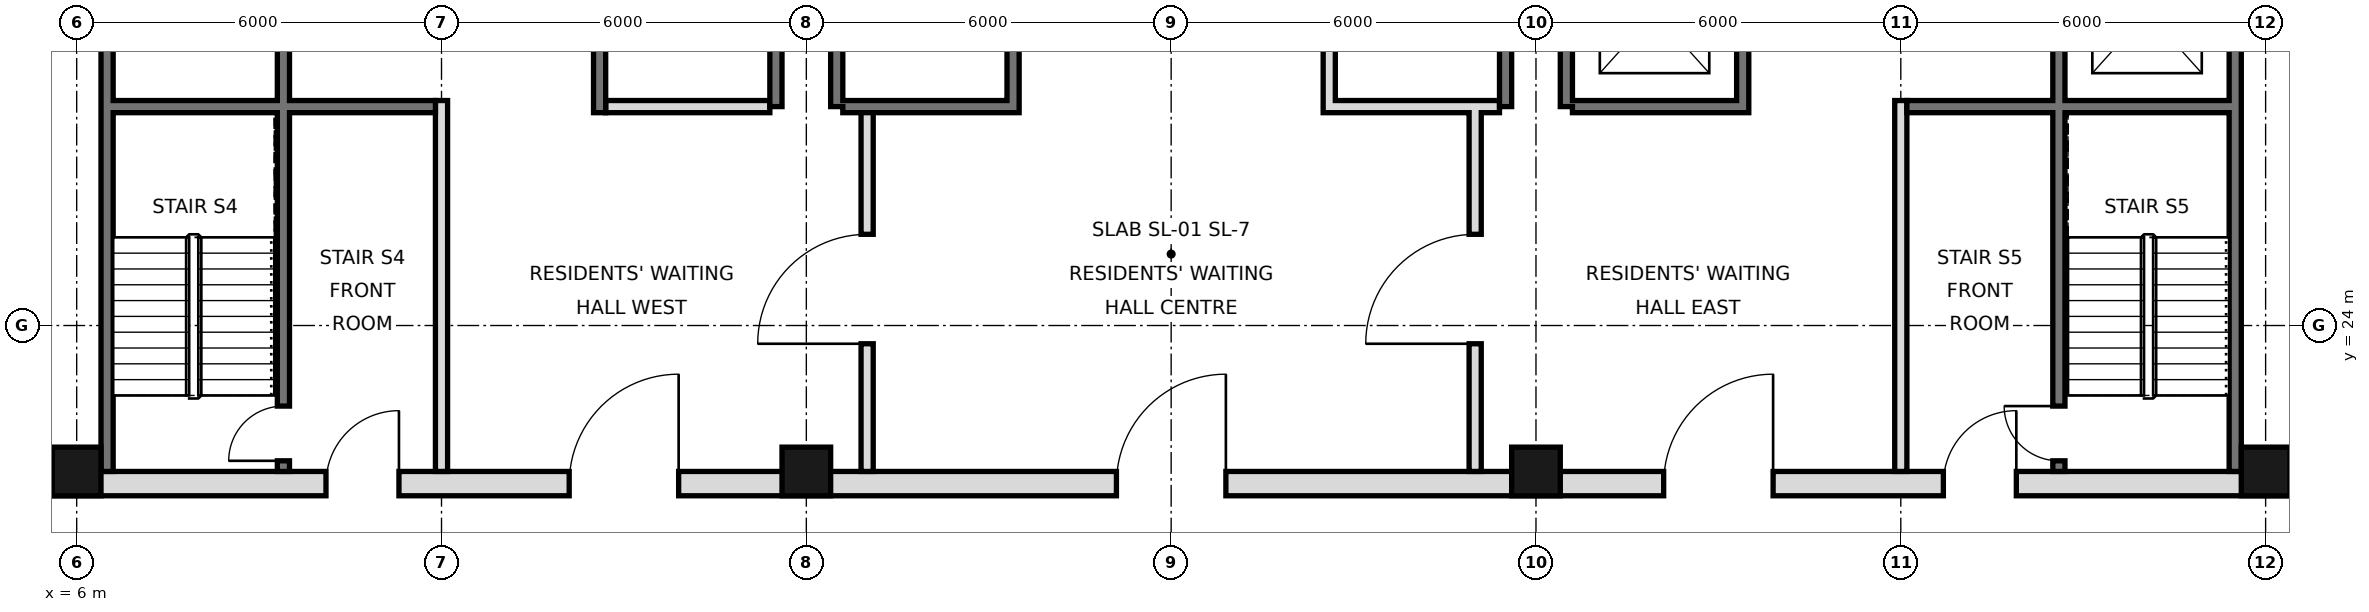
"""IFC4 building model, lengths in metres.
Left out: names, types, materials, properties, quantities, classifications, styles, units other than length and angle.
Written with IfcOpenShell. Run it as: python <this file> out.ifc"""

import sys

from ifc_helpers import new_model, si_unit, direction, frame, frame_2d, origin, origin_2d, place, context, subcontext, project, spatial, rectangle, hollow_rectangle, extrude, element, fill, save


model = new_model("IFC4")
c1 = context("Model", 3, precision=1e-05, world=origin(), true_north=direction((0.0, 1.0)))
c2 = subcontext(c1, "Body", "Model", "MODEL_VIEW")
j1 = project(units=[si_unit("LENGTHUNIT", "METRE"), si_unit("PLANEANGLEUNIT", "RADIAN")], contexts=[c1])
p1 = place(None, origin())
s1 = spatial("IfcSite", under=j1, at=p1, CompositionType="ELEMENT")
p2 = place(p1, origin())
s2 = spatial("IfcBuilding", under=s1, at=p2, CompositionType="ELEMENT")
p3 = place(p2, frame((0.0, 0.0, 195.6)))
s3 = spatial("IfcBuildingStorey", under=s2, at=p3, CompositionType="ELEMENT", Elevation=195.6)
for number, where, z_axis, x_axis in (
    (1, (6.0, 21.6, 0.0), (0.0, 0.0, 1.0), (1.0, 0.0, 0.0)),
    (2, (18.0, 21.6, 0.0), (0.0, 0.0, 1.0), (1.0, 0.0, 0.0)),
    (3, (30.0, 21.6, 0.0), (0.0, 0.0, 1.0), (1.0, 0.0, 0.0)),
    (4, (42.0, 21.6, 0.0), (0.0, 0.0, 1.0), (1.0, 0.0, 0.0)),
):
    element("IfcColumn", number, at=place(p3, frame(where, z_axis=z_axis, x_axis=x_axis)), inside=s3, PredefinedType="COLUMN", context=c2, shape_type="SweptSolid", body=[
        extrude(hollow_rectangle(XDim=0.8, YDim=0.8, WallThickness=0.045, at=origin_2d()), origin(), (0.0, 0.0, 1.0), 3.6),
    ])
for number, where, z_axis, x_axis in (
    (5, (6.5, 21.6, 0.0), (0.0, 0.0, 1.0), (0.0, 1.0, 0.0)),
    (6, (41.5, 21.6, 0.0), (0.0, 0.0, 1.0), (0.0, 1.0, 0.0)),
):
    element("IfcWall", number, at=place(p3, frame(where, z_axis=z_axis, x_axis=x_axis)), inside=s3, PredefinedType="SOLIDWALL", context=c2, shape_type="SweptSolid", body=[
        extrude(rectangle(XDim=23.5, YDim=0.2, at=frame_2d((11.75, 0.0))), origin(), (0.0, 0.0, 1.0), 3.42),
    ])
for number, where, z_axis, x_axis in (
    (7, (17.5, 27.6, 0.0), (0.0, 0.0, 1.0), (0.0, 1.0, 0.0)),
    (8, (18.5, 27.6, 0.0), (0.0, 0.0, 1.0), (0.0, 1.0, 0.0)),
    (9, (29.5, 27.6, 0.0), (0.0, 0.0, 1.0), (0.0, 1.0, 0.0)),
    (10, (30.5, 27.6, 0.0), (0.0, 0.0, 1.0), (0.0, 1.0, 0.0)),
):
    element("IfcWall", number, at=place(p3, frame(where, z_axis=z_axis, x_axis=x_axis)), inside=s3, PredefinedType="SOLIDWALL", context=c2, shape_type="SweptSolid", body=[
        extrude(rectangle(XDim=17.5, YDim=0.2, at=frame_2d((8.75, 0.0))), origin(), (0.0, 0.0, 1.0), 3.42),
    ])
p4 = place(p3, frame((5.6, 21.4, 0.0), z_axis=(0.0, 0.0, 1.0), x_axis=(1.0, 0.0, 0.0)))
e11 = element("IfcWall", 11, at=p4, inside=s3, PredefinedType="SOLIDWALL", context=c2, shape_type="SweptSolid", body=[
    extrude(rectangle(XDim=36.8, YDim=0.4, at=frame_2d((18.4, 0.0))), origin(), (0.0, 0.0, 1.0), 3.42),
])
p5 = place(p4, frame((8.5, 0.0, 0.0)))
e12 = element("IfcOpeningElement", 12, at=p5, cuts=e11, PredefinedType="OPENING", context=c2, shape_type="SweptSolid", body=[
    extrude(rectangle(XDim=1.8, YDim=2.1, at=frame_2d((0.9, 1.05))), frame((0.0, 0.21, 0.0), z_axis=(0.0, -1.0, 0.0), x_axis=(1.0, 0.0, 0.0)), (0.0, 0.0, 1.0), 0.42),
])
p6 = place(p4, frame((17.5, 0.0, 0.0)))
e13 = element("IfcOpeningElement", 13, at=p6, cuts=e11, PredefinedType="OPENING", context=c2, shape_type="SweptSolid", body=[
    extrude(rectangle(XDim=1.8, YDim=2.1, at=frame_2d((0.9, 1.05))), frame((0.0, 0.21, 0.0), z_axis=(0.0, -1.0, 0.0), x_axis=(1.0, 0.0, 0.0)), (0.0, 0.0, 1.0), 0.42),
])
p7 = place(p4, frame((26.5, 0.0, 0.0)))
e14 = element("IfcOpeningElement", 14, at=p7, cuts=e11, PredefinedType="OPENING", context=c2, shape_type="SweptSolid", body=[
    extrude(rectangle(XDim=1.8, YDim=2.1, at=frame_2d((0.9, 1.05))), frame((0.0, 0.21, 0.0), z_axis=(0.0, -1.0, 0.0), x_axis=(1.0, 0.0, 0.0)), (0.0, 0.0, 1.0), 0.42),
])
p8 = place(p4, frame((4.5, 0.0, 0.0)))
e15 = element("IfcOpeningElement", 15, at=p8, cuts=e11, PredefinedType="OPENING", context=c2, shape_type="SweptSolid", body=[
    extrude(rectangle(XDim=1.2, YDim=2.1, at=frame_2d((0.6, 1.05))), frame((0.0, 0.21, 0.0), z_axis=(0.0, -1.0, 0.0), x_axis=(1.0, 0.0, 0.0)), (0.0, 0.0, 1.0), 0.42),
])
p9 = place(p4, frame((31.1, 0.0, 0.0)))
e16 = element("IfcOpeningElement", 16, at=p9, cuts=e11, PredefinedType="OPENING", context=c2, shape_type="SweptSolid", body=[
    extrude(rectangle(XDim=1.2, YDim=2.1, at=frame_2d((0.6, 1.05))), frame((0.0, 0.21, 0.0), z_axis=(0.0, -1.0, 0.0), x_axis=(1.0, 0.0, 0.0)), (0.0, 0.0, 1.0), 0.42),
])
p10 = place(p3, frame((19.0, 21.6, 0.0), z_axis=(0.0, 0.0, 1.0), x_axis=(0.0, 1.0, 0.0)))
e17 = element("IfcWall", 17, at=p10, inside=s3, PredefinedType="PARTITIONING", context=c2, shape_type="SweptSolid", body=[
    extrude(rectangle(XDim=6.0, YDim=0.2, at=frame_2d((3.0, 0.0))), origin(), (0.0, 0.0, 1.0), 3.42),
])
p11 = place(p10, frame((2.1, 0.0, 0.0)))
e18 = element("IfcOpeningElement", 18, at=p11, cuts=e17, PredefinedType="OPENING", context=c2, shape_type="SweptSolid", body=[
    extrude(rectangle(XDim=1.8, YDim=2.1, at=frame_2d((0.9, 1.05))), frame((0.0, 0.11, 0.0), z_axis=(0.0, -1.0, 0.0), x_axis=(1.0, 0.0, 0.0)), (0.0, 0.0, 1.0), 0.22),
])
p12 = place(p3, frame((29.0, 21.6, 0.0), z_axis=(0.0, 0.0, 1.0), x_axis=(0.0, 1.0, 0.0)))
e19 = element("IfcWall", 19, at=p12, inside=s3, PredefinedType="PARTITIONING", context=c2, shape_type="SweptSolid", body=[
    extrude(rectangle(XDim=6.0, YDim=0.2, at=frame_2d((3.0, 0.0))), origin(), (0.0, 0.0, 1.0), 3.42),
])
p13 = place(p12, frame((2.1, 0.0, 0.0)))
e20 = element("IfcOpeningElement", 20, at=p13, cuts=e19, PredefinedType="OPENING", context=c2, shape_type="SweptSolid", body=[
    extrude(rectangle(XDim=1.8, YDim=2.1, at=frame_2d((0.9, 1.05))), frame((0.0, 0.11, 0.0), z_axis=(0.0, -1.0, 0.0), x_axis=(1.0, 0.0, 0.0)), (0.0, 0.0, 1.0), 0.22),
])
p14 = place(p3, frame((12.0, 21.6, 0.0), z_axis=(0.0, 0.0, 1.0), x_axis=(0.0, 1.0, 0.0)))
e21 = element("IfcWall", 21, at=p14, inside=s3, PredefinedType="PARTITIONING", context=c2, shape_type="SweptSolid", body=[
    extrude(rectangle(XDim=6.1, YDim=0.2, at=frame_2d((3.05, 0.0))), origin(), (0.0, 0.0, 1.0), 3.42),
])
p15 = place(p3, frame((14.6, 27.5, 0.0), z_axis=(0.0, 0.0, 1.0), x_axis=(0.0, 1.0, 0.0)))
e22 = element("IfcWall", 22, at=p15, inside=s3, PredefinedType="SOLIDWALL", context=c2, shape_type="SweptSolid", body=[
    extrude(rectangle(XDim=17.5, YDim=0.2, at=frame_2d((8.75, 0.0))), origin(), (0.0, 0.0, 1.0), 3.42),
])
p16 = place(p15, frame((15.4, 0.0, 0.0)))
e23 = element("IfcOpeningElement", 23, at=p16, cuts=e22, PredefinedType="OPENING", context=c2, shape_type="SweptSolid", body=[
    extrude(rectangle(XDim=1.1, YDim=2.1, at=frame_2d((0.55, 1.05))), frame((0.0, 0.11, 0.0), z_axis=(0.0, -1.0, 0.0), x_axis=(1.0, 0.0, 0.0)), (0.0, 0.0, 1.0), 0.22),
])
p17 = place(p15, frame((2.7, 0.0, 0.0)))
e24 = element("IfcOpeningElement", 24, at=p17, cuts=e22, PredefinedType="OPENING", context=c2, shape_type="SweptSolid", body=[
    extrude(rectangle(XDim=1.0, YDim=2.1, at=frame_2d((0.5, 1.05))), frame((0.0, 0.11, 0.0), z_axis=(0.0, -1.0, 0.0), x_axis=(1.0, 0.0, 0.0)), (0.0, 0.0, 1.0), 0.22),
])
p18 = place(p15, frame((9.9, 0.0, 0.0)))
e25 = element("IfcOpeningElement", 25, at=p18, cuts=e22, PredefinedType="OPENING", context=c2, shape_type="SweptSolid", body=[
    extrude(rectangle(XDim=0.9, YDim=2.1, at=frame_2d((0.45, 1.05))), frame((0.0, 0.11, 0.0), z_axis=(0.0, -1.0, 0.0), x_axis=(1.0, 0.0, 0.0)), (0.0, 0.0, 1.0), 0.22),
])
p19 = place(p3, frame((21.4, 27.5, 0.0), z_axis=(0.0, 0.0, 1.0), x_axis=(0.0, 1.0, 0.0)))
e26 = element("IfcWall", 26, at=p19, inside=s3, PredefinedType="SOLIDWALL", context=c2, shape_type="SweptSolid", body=[
    extrude(rectangle(XDim=17.5, YDim=0.2, at=frame_2d((8.75, 0.0))), origin(), (0.0, 0.0, 1.0), 3.42),
])
p20 = place(p19, frame((16.2, 0.0, 0.0)))
e27 = element("IfcOpeningElement", 27, at=p20, cuts=e26, PredefinedType="OPENING", context=c2, shape_type="SweptSolid", body=[
    extrude(rectangle(XDim=1.0, YDim=2.1, at=frame_2d((0.5, 1.05))), frame((0.0, 0.11, 0.0), z_axis=(0.0, -1.0, 0.0), x_axis=(1.0, 0.0, 0.0)), (0.0, 0.0, 1.0), 0.22),
])
p21 = place(p19, frame((7.4, 0.0, 0.0)))
e28 = element("IfcOpeningElement", 28, at=p21, cuts=e26, PredefinedType="OPENING", context=c2, shape_type="SweptSolid", body=[
    extrude(rectangle(XDim=0.9, YDim=2.1, at=frame_2d((0.45, 1.05))), frame((0.0, 0.11, 0.0), z_axis=(0.0, -1.0, 0.0), x_axis=(1.0, 0.0, 0.0)), (0.0, 0.0, 1.0), 0.22),
])
p22 = place(p3, frame((26.6, 27.5, 0.0), z_axis=(0.0, 0.0, 1.0), x_axis=(0.0, 1.0, 0.0)))
e29 = element("IfcWall", 29, at=p22, inside=s3, PredefinedType="SOLIDWALL", context=c2, shape_type="SweptSolid", body=[
    extrude(rectangle(XDim=17.5, YDim=0.2, at=frame_2d((8.75, 0.0))), origin(), (0.0, 0.0, 1.0), 3.42),
])
p23 = place(p22, frame((4.3, 0.0, 0.0)))
e30 = element("IfcOpeningElement", 30, at=p23, cuts=e29, PredefinedType="OPENING", context=c2, shape_type="SweptSolid", body=[
    extrude(rectangle(XDim=0.9, YDim=2.1, at=frame_2d((0.45, 1.05))), frame((0.0, 0.11, 0.0), z_axis=(0.0, -1.0, 0.0), x_axis=(1.0, 0.0, 0.0)), (0.0, 0.0, 1.0), 0.22),
])
p24 = place(p22, frame((10.35, 0.0, 0.0)))
e31 = element("IfcOpeningElement", 31, at=p24, cuts=e29, PredefinedType="OPENING", context=c2, shape_type="SweptSolid", body=[
    extrude(rectangle(XDim=1.0, YDim=2.1, at=frame_2d((0.5, 1.05))), frame((0.0, 0.11, 0.0), z_axis=(0.0, -1.0, 0.0), x_axis=(1.0, 0.0, 0.0)), (0.0, 0.0, 1.0), 0.22),
])
p25 = place(p22, frame((15.475, 0.0, 0.0)))
e32 = element("IfcOpeningElement", 32, at=p25, cuts=e29, PredefinedType="OPENING", context=c2, shape_type="SweptSolid", body=[
    extrude(rectangle(XDim=1.0, YDim=2.1, at=frame_2d((0.5, 1.05))), frame((0.0, 0.11, 0.0), z_axis=(0.0, -1.0, 0.0), x_axis=(1.0, 0.0, 0.0)), (0.0, 0.0, 1.0), 0.22),
])
p26 = place(p3, frame((33.4, 27.5, 0.0), z_axis=(0.0, 0.0, 1.0), x_axis=(0.0, 1.0, 0.0)))
e33 = element("IfcWall", 33, at=p26, inside=s3, PredefinedType="SOLIDWALL", context=c2, shape_type="SweptSolid", body=[
    extrude(rectangle(XDim=17.5, YDim=0.2, at=frame_2d((8.75, 0.0))), origin(), (0.0, 0.0, 1.0), 3.42),
])
p27 = place(p26, frame((1.1, 0.0, 0.0)))
e34 = element("IfcOpeningElement", 34, at=p27, cuts=e33, PredefinedType="OPENING", context=c2, shape_type="SweptSolid", body=[
    extrude(rectangle(XDim=1.1, YDim=2.1, at=frame_2d((0.55, 1.05))), frame((0.0, 0.11, 0.0), z_axis=(0.0, -1.0, 0.0), x_axis=(1.0, 0.0, 0.0)), (0.0, 0.0, 1.0), 0.22),
])
p28 = place(p26, frame((4.2, 0.0, 0.0)))
e35 = element("IfcOpeningElement", 35, at=p28, cuts=e33, PredefinedType="OPENING", context=c2, shape_type="SweptSolid", body=[
    extrude(rectangle(XDim=1.1, YDim=2.1, at=frame_2d((0.55, 1.05))), frame((0.0, 0.11, 0.0), z_axis=(0.0, -1.0, 0.0), x_axis=(1.0, 0.0, 0.0)), (0.0, 0.0, 1.0), 0.22),
])
p29 = place(p26, frame((15.4, 0.0, 0.0)))
e36 = element("IfcOpeningElement", 36, at=p29, cuts=e33, PredefinedType="OPENING", context=c2, shape_type="SweptSolid", body=[
    extrude(rectangle(XDim=1.1, YDim=2.1, at=frame_2d((0.55, 1.05))), frame((0.0, 0.11, 0.0), z_axis=(0.0, -1.0, 0.0), x_axis=(1.0, 0.0, 0.0)), (0.0, 0.0, 1.0), 0.22),
])
p30 = place(p26, frame((9.9, 0.0, 0.0)))
e37 = element("IfcOpeningElement", 37, at=p30, cuts=e33, PredefinedType="OPENING", context=c2, shape_type="SweptSolid", body=[
    extrude(rectangle(XDim=0.9, YDim=2.1, at=frame_2d((0.45, 1.05))), frame((0.0, 0.11, 0.0), z_axis=(0.0, -1.0, 0.0), x_axis=(1.0, 0.0, 0.0)), (0.0, 0.0, 1.0), 0.22),
])
p31 = place(p3, frame((36.0, 21.6, 0.0), z_axis=(0.0, 0.0, 1.0), x_axis=(0.0, 1.0, 0.0)))
e38 = element("IfcWall", 38, at=p31, inside=s3, PredefinedType="PARTITIONING", context=c2, shape_type="SweptSolid", body=[
    extrude(rectangle(XDim=6.1, YDim=0.2, at=frame_2d((3.05, 0.0))), origin(), (0.0, 0.0, 1.0), 3.42),
])
p32 = place(p3, frame((38.6, 21.6, 0.0), z_axis=(0.0, 0.0, 1.0), x_axis=(0.0, 1.0, 0.0)))
e39 = element("IfcWall", 39, at=p32, inside=s3, PredefinedType="SOLIDWALL", context=c2, shape_type="SweptSolid", body=[
    extrude(rectangle(XDim=23.4, YDim=0.2, at=frame_2d((11.7, 0.0))), origin(), (0.0, 0.0, 1.0), 3.42),
])
p33 = place(p32, frame((7.0, 0.0, 0.0)))
e40 = element("IfcOpeningElement", 40, at=p33, cuts=e39, PredefinedType="OPENING", context=c2, shape_type="SweptSolid", body=[
    extrude(rectangle(XDim=1.1, YDim=2.1, at=frame_2d((0.55, 1.05))), frame((0.0, 0.11, 0.0), z_axis=(0.0, -1.0, 0.0), x_axis=(1.0, 0.0, 0.0)), (0.0, 0.0, 1.0), 0.22),
])
p34 = place(p32, frame((10.1, 0.0, 0.0)))
e41 = element("IfcOpeningElement", 41, at=p34, cuts=e39, PredefinedType="OPENING", context=c2, shape_type="SweptSolid", body=[
    extrude(rectangle(XDim=1.1, YDim=2.1, at=frame_2d((0.55, 1.05))), frame((0.0, 0.11, 0.0), z_axis=(0.0, -1.0, 0.0), x_axis=(1.0, 0.0, 0.0)), (0.0, 0.0, 1.0), 0.22),
])
p35 = place(p32, frame((13.2, 0.0, 0.0)))
e42 = element("IfcOpeningElement", 42, at=p35, cuts=e39, PredefinedType="OPENING", context=c2, shape_type="SweptSolid", body=[
    extrude(rectangle(XDim=1.1, YDim=2.1, at=frame_2d((0.55, 1.05))), frame((0.0, 0.11, 0.0), z_axis=(0.0, -1.0, 0.0), x_axis=(1.0, 0.0, 0.0)), (0.0, 0.0, 1.0), 0.22),
])
p36 = place(p32, frame((22.1, 0.0, 0.0)))
e43 = element("IfcOpeningElement", 43, at=p36, cuts=e39, PredefinedType="OPENING", context=c2, shape_type="SweptSolid", body=[
    extrude(rectangle(XDim=1.0, YDim=2.1, at=frame_2d((0.5, 1.05))), frame((0.0, 0.11, 0.0), z_axis=(0.0, -1.0, 0.0), x_axis=(1.0, 0.0, 0.0)), (0.0, 0.0, 1.0), 0.22),
])
p37 = place(p32, frame((0.175, 0.0, 0.0)))
e44 = element("IfcOpeningElement", 44, at=p37, cuts=e39, PredefinedType="OPENING", context=c2, shape_type="SweptSolid", body=[
    extrude(rectangle(XDim=0.9, YDim=2.1, at=frame_2d((0.45, 1.05))), frame((0.0, 0.11, 0.0), z_axis=(0.0, -1.0, 0.0), x_axis=(1.0, 0.0, 0.0)), (0.0, 0.0, 1.0), 0.22),
])
p38 = place(p3, frame((9.4, 21.6, 0.0), z_axis=(0.0, 0.0, 1.0), x_axis=(0.0, 1.0, 0.0)))
e45 = element("IfcWall", 45, at=p38, inside=s3, PredefinedType="SOLIDWALL", context=c2, shape_type="SweptSolid", body=[
    extrude(rectangle(XDim=23.4, YDim=0.2, at=frame_2d((11.7, 0.0))), origin(), (0.0, 0.0, 1.0), 3.42),
])
p39 = place(p38, frame((7.8, 0.0, 0.0)))
e46 = element("IfcOpeningElement", 46, at=p39, cuts=e45, PredefinedType="OPENING", context=c2, shape_type="SweptSolid", body=[
    extrude(rectangle(XDim=1.0, YDim=2.1, at=frame_2d((0.5, 1.05))), frame((0.0, 0.11, 0.0), z_axis=(0.0, -1.0, 0.0), x_axis=(1.0, 0.0, 0.0)), (0.0, 0.0, 1.0), 0.22),
])
p40 = place(p38, frame((12.45, 0.0, 0.0)))
e47 = element("IfcOpeningElement", 47, at=p40, cuts=e45, PredefinedType="OPENING", context=c2, shape_type="SweptSolid", body=[
    extrude(rectangle(XDim=1.0, YDim=2.1, at=frame_2d((0.5, 1.05))), frame((0.0, 0.11, 0.0), z_axis=(0.0, -1.0, 0.0), x_axis=(1.0, 0.0, 0.0)), (0.0, 0.0, 1.0), 0.22),
])
p41 = place(p38, frame((22.1, 0.0, 0.0)))
e48 = element("IfcOpeningElement", 48, at=p41, cuts=e45, PredefinedType="OPENING", context=c2, shape_type="SweptSolid", body=[
    extrude(rectangle(XDim=1.0, YDim=2.1, at=frame_2d((0.5, 1.05))), frame((0.0, 0.11, 0.0), z_axis=(0.0, -1.0, 0.0), x_axis=(1.0, 0.0, 0.0)), (0.0, 0.0, 1.0), 0.22),
])
p42 = place(p38, frame((0.175, 0.0, 0.0)))
e49 = element("IfcOpeningElement", 49, at=p42, cuts=e45, PredefinedType="OPENING", context=c2, shape_type="SweptSolid", body=[
    extrude(rectangle(XDim=0.9, YDim=2.1, at=frame_2d((0.45, 1.05))), frame((0.0, 0.11, 0.0), z_axis=(0.0, -1.0, 0.0), x_axis=(1.0, 0.0, 0.0)), (0.0, 0.0, 1.0), 0.22),
])
p43 = place(p3, frame((14.7, 27.6, 0.0), z_axis=(0.0, 0.0, 1.0), x_axis=(1.0, 0.0, 0.0)))
e50 = element("IfcWall", 50, at=p43, inside=s3, PredefinedType="PARTITIONING", context=c2, shape_type="SweptSolid", body=[
    extrude(rectangle(XDim=2.7, YDim=0.2, at=frame_2d((1.35, 0.0))), origin(), (0.0, 0.0, 1.0), 3.42),
])
for number, where, z_axis, x_axis in (
    (51, (18.6, 27.6, 0.0), (0.0, 0.0, 1.0), (1.0, 0.0, 0.0)),
    (52, (26.7, 27.6, 0.0), (0.0, 0.0, 1.0), (1.0, 0.0, 0.0)),
    (53, (30.6, 27.6, 0.0), (0.0, 0.0, 1.0), (1.0, 0.0, 0.0)),
):
    element("IfcWall", number, at=place(p3, frame(where, z_axis=z_axis, x_axis=x_axis)), inside=s3, PredefinedType="SOLIDWALL", context=c2, shape_type="SweptSolid", body=[
        extrude(rectangle(XDim=2.7, YDim=0.2, at=frame_2d((1.35, 0.0))), origin(), (0.0, 0.0, 1.0), 3.42),
    ])
for number, where, z_axis, x_axis in (
    (54, (36.1, 27.6, 0.0), (0.0, 0.0, 1.0), (1.0, 0.0, 0.0)),
    (55, (6.6, 27.6, 0.0), (0.0, 0.0, 1.0), (1.0, 0.0, 0.0)),
):
    element("IfcWall", number, at=place(p3, frame(where, z_axis=z_axis, x_axis=x_axis)), inside=s3, PredefinedType="SOLIDWALL", context=c2, shape_type="SweptSolid", body=[
        extrude(rectangle(XDim=5.3, YDim=0.2, at=frame_2d((2.65, 0.0))), origin(), (0.0, 0.0, 1.0), 3.42),
    ])
p44 = place(p5, frame((1.8, 0.0, 0.0), z_axis=(0.0, 0.0, 1.0), x_axis=(-1.0, 0.0, 0.0)))
e56 = element("IfcDoor", 56, at=p44, inside=s3, OperationType="SINGLE_SWING_LEFT", PredefinedType="DOOR", context=c2, shape_type="SweptSolid", body=[
    extrude(rectangle(XDim=1.8, YDim=2.1, at=frame_2d((0.9, 1.05))), frame((0.0, 0.025, 0.0), z_axis=(0.0, -1.0, 0.0), x_axis=(1.0, 0.0, 0.0)), (0.0, 0.0, 1.0), 0.05),
])
fill(e12, e56)
p45 = place(p11, origin())
e57 = element("IfcDoor", 57, at=p45, inside=s3, OperationType="SINGLE_SWING_LEFT", PredefinedType="DOOR", context=c2, shape_type="SweptSolid", body=[
    extrude(rectangle(XDim=1.8, YDim=2.1, at=frame_2d((0.9, 1.05))), frame((0.0, 0.025, 0.0), z_axis=(0.0, -1.0, 0.0), x_axis=(1.0, 0.0, 0.0)), (0.0, 0.0, 1.0), 0.05),
])
fill(e18, e57)
p46 = place(p6, frame((1.8, 0.0, 0.0), z_axis=(0.0, 0.0, 1.0), x_axis=(-1.0, 0.0, 0.0)))
e58 = element("IfcDoor", 58, at=p46, inside=s3, OperationType="SINGLE_SWING_LEFT", PredefinedType="DOOR", context=c2, shape_type="SweptSolid", body=[
    extrude(rectangle(XDim=1.8, YDim=2.1, at=frame_2d((0.9, 1.05))), frame((0.0, 0.025, 0.0), z_axis=(0.0, -1.0, 0.0), x_axis=(1.0, 0.0, 0.0)), (0.0, 0.0, 1.0), 0.05),
])
fill(e13, e58)
p47 = place(p13, origin())
e59 = element("IfcDoor", 59, at=p47, inside=s3, OperationType="SINGLE_SWING_LEFT", PredefinedType="DOOR", context=c2, shape_type="SweptSolid", body=[
    extrude(rectangle(XDim=1.8, YDim=2.1, at=frame_2d((0.9, 1.05))), frame((0.0, 0.025, 0.0), z_axis=(0.0, -1.0, 0.0), x_axis=(1.0, 0.0, 0.0)), (0.0, 0.0, 1.0), 0.05),
])
fill(e20, e59)
p48 = place(p7, frame((1.8, 0.0, 0.0), z_axis=(0.0, 0.0, 1.0), x_axis=(-1.0, 0.0, 0.0)))
e60 = element("IfcDoor", 60, at=p48, inside=s3, OperationType="SINGLE_SWING_LEFT", PredefinedType="DOOR", context=c2, shape_type="SweptSolid", body=[
    extrude(rectangle(XDim=1.8, YDim=2.1, at=frame_2d((0.9, 1.05))), frame((0.0, 0.025, 0.0), z_axis=(0.0, -1.0, 0.0), x_axis=(1.0, 0.0, 0.0)), (0.0, 0.0, 1.0), 0.05),
])
fill(e14, e60)
p49 = place(p8, frame((1.2, 0.0, 0.0), z_axis=(0.0, 0.0, 1.0), x_axis=(-1.0, 0.0, 0.0)))
e61 = element("IfcDoor", 61, at=p49, inside=s3, OperationType="SINGLE_SWING_LEFT", PredefinedType="DOOR", context=c2, shape_type="SweptSolid", body=[
    extrude(rectangle(XDim=1.2, YDim=2.1, at=frame_2d((0.6, 1.05))), frame((0.0, 0.025, 0.0), z_axis=(0.0, -1.0, 0.0), x_axis=(1.0, 0.0, 0.0)), (0.0, 0.0, 1.0), 0.05),
])
fill(e15, e61)
p50 = place(p9, frame((1.2, 0.0, 0.0), z_axis=(0.0, 0.0, 1.0), x_axis=(-1.0, 0.0, 0.0)))
e62 = element("IfcDoor", 62, at=p50, inside=s3, OperationType="SINGLE_SWING_LEFT", PredefinedType="DOOR", context=c2, shape_type="SweptSolid", body=[
    extrude(rectangle(XDim=1.2, YDim=2.1, at=frame_2d((0.6, 1.05))), frame((0.0, 0.025, 0.0), z_axis=(0.0, -1.0, 0.0), x_axis=(1.0, 0.0, 0.0)), (0.0, 0.0, 1.0), 0.05),
])
fill(e16, e62)
p51 = place(p42, origin())
e63 = element("IfcDoor", 63, at=p51, inside=s3, OperationType="SINGLE_SWING_LEFT", PredefinedType="DOOR", context=c2, shape_type="SweptSolid", body=[
    extrude(rectangle(XDim=0.9, YDim=2.1, at=frame_2d((0.45, 1.05))), frame((0.0, 0.025, 0.0), z_axis=(0.0, -1.0, 0.0), x_axis=(1.0, 0.0, 0.0)), (0.0, 0.0, 1.0), 0.05),
])
fill(e49, e63)
p52 = place(p37, frame((0.9, 0.0, 0.0), z_axis=(0.0, 0.0, 1.0), x_axis=(-1.0, 0.0, 0.0)))
e64 = element("IfcDoor", 64, at=p52, inside=s3, OperationType="SINGLE_SWING_LEFT", PredefinedType="DOOR", context=c2, shape_type="SweptSolid", body=[
    extrude(rectangle(XDim=0.9, YDim=2.1, at=frame_2d((0.45, 1.05))), frame((0.0, 0.025, 0.0), z_axis=(0.0, -1.0, 0.0), x_axis=(1.0, 0.0, 0.0)), (0.0, 0.0, 1.0), 0.05),
])
fill(e44, e64)
save(model, sys.argv[1])
